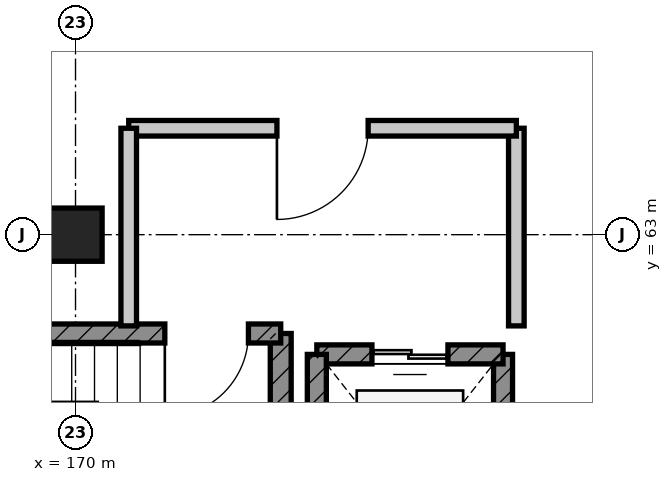
"""IFC4 building model, lengths in metres.
Left out: names, types, materials, properties, quantities, classifications, styles, units other than length and angle.
Written with IfcOpenShell. Run it as: python <this file> out.ifc"""

import sys

from ifc_helpers import new_model, si_unit, direction, frame, frame_2d, origin, origin_2d, place, context, subcontext, project, spatial, rectangle, extrude, element, fill, save


model = new_model("IFC4")
c1 = context("Model", 3, precision=1e-05, world=origin(), true_north=direction((0.0, 1.0)))
c2 = subcontext(c1, "Body", "Model", "MODEL_VIEW")
j1 = project(units=[si_unit("LENGTHUNIT", "METRE"), si_unit("PLANEANGLEUNIT", "RADIAN")], contexts=[c1])
p1 = place(None, origin())
s1 = spatial("IfcSite", under=j1, at=p1, CompositionType="ELEMENT")
p2 = place(p1, origin())
s2 = spatial("IfcBuilding", under=s1, at=p2, CompositionType="ELEMENT")
p3 = place(p2, frame((0.0, 0.0, -4.5)))
s3 = spatial("IfcBuildingStorey", under=s2, at=p3, CompositionType="ELEMENT", Elevation=-4.5)
p4 = place(p3, frame((170.0, 63.0, 0.0), z_axis=(0.0, 0.0, 1.0), x_axis=(1.0, 0.0, 0.0)))
e1 = element("IfcColumn", 1, at=p4, inside=s3, PredefinedType="COLUMN", context=c2, shape_type="SweptSolid", body=[
    extrude(rectangle(XDim=0.7, YDim=0.7, at=origin_2d()), origin(), (0.0, 0.0, 1.0), 4.5),
])
p5 = place(p3, frame((172.7, 58.1, 0.0), z_axis=(0.0, 0.0, 1.0), x_axis=(0.0, 1.0, 0.0)))
e2 = element("IfcWall", 2, at=p5, inside=s3, PredefinedType="SHEAR", context=c2, shape_type="SweptSolid", body=[
    extrude(rectangle(XDim=3.6, YDim=0.275, at=frame_2d((1.8, 0.0))), origin(), (0.0, 0.0, 1.0), 4.2),
])
p6 = place(p3, frame((172.7, 61.7, 0.0), z_axis=(0.0, 0.0, 1.0), x_axis=(-1.0, 0.0, 0.0)))
e3 = element("IfcWall", 3, at=p6, inside=s3, PredefinedType="SHEAR", context=c2, shape_type="SweptSolid", body=[
    extrude(rectangle(XDim=8.6, YDim=0.25, at=frame_2d((4.3, 0.0))), origin(), (0.0, 0.0, 1.0), 4.2),
])
p7 = place(p6, frame((0.425, 0.0, 0.0)))
e4 = element("IfcOpeningElement", 4, at=p7, cuts=e3, PredefinedType="OPENING", context=c2, shape_type="SweptSolid", body=[
    extrude(rectangle(XDim=1.1, YDim=2.1, at=frame_2d((0.55, 1.05))), frame((0.0, 0.135, 0.0), z_axis=(0.0, -1.0, 0.0), x_axis=(1.0, 0.0, 0.0)), (0.0, 0.0, 1.0), 0.27),
])
p8 = place(p3, frame((175.625, 58.375, 0.0), z_axis=(0.0, 0.0, 1.0), x_axis=(0.0, 1.0, 0.0)))
e5 = element("IfcWall", 5, at=p8, inside=s3, PredefinedType="SHEAR", context=c2, shape_type="SweptSolid", body=[
    extrude(rectangle(XDim=3.05, YDim=0.25, at=frame_2d((1.525, 0.0))), origin(), (0.0, 0.0, 1.0), 4.2),
])
p9 = place(p3, frame((175.625, 61.425, 0.0), z_axis=(0.0, 0.0, 1.0), x_axis=(-1.0, 0.0, 0.0)))
e6 = element("IfcWall", 6, at=p9, inside=s3, PredefinedType="SHEAR", context=c2, shape_type="SweptSolid", body=[
    extrude(rectangle(XDim=2.45, YDim=0.25, at=frame_2d((1.225, 0.0))), origin(), (0.0, 0.0, 1.0), 4.2),
])
p10 = place(p9, frame((0.725, 0.0, 0.0)))
e7 = element("IfcOpeningElement", 7, at=p10, cuts=e6, PredefinedType="OPENING", context=c2, shape_type="SweptSolid", body=[
    extrude(rectangle(XDim=1.0, YDim=2.15, at=frame_2d((0.5, 1.075))), frame((0.0, 0.135, 0.0), z_axis=(0.0, -1.0, 0.0), x_axis=(1.0, 0.0, 0.0)), (0.0, 0.0, 1.0), 0.27),
])
p11 = place(p3, frame((173.175, 61.425, 0.0), z_axis=(0.0, 0.0, 1.0), x_axis=(0.0, -1.0, 0.0)))
e8 = element("IfcWall", 8, at=p11, inside=s3, PredefinedType="SHEAR", context=c2, shape_type="SweptSolid", body=[
    extrude(rectangle(XDim=3.05, YDim=0.25, at=frame_2d((1.525, 0.0))), origin(), (0.0, 0.0, 1.0), 4.2),
])
p12 = place(p3, frame((175.8, 61.8, 0.0), z_axis=(0.0, 0.0, 1.0), x_axis=(0.0, 1.0, 0.0)))
e9 = element("IfcWall", 9, at=p12, inside=s3, PredefinedType="PARTITIONING", context=c2, shape_type="SweptSolid", body=[
    extrude(rectangle(XDim=2.6, YDim=0.205, at=frame_2d((1.3, 0.0))), origin(), (0.0, 0.0, 1.0), 3.535),
])
p13 = place(p3, frame((175.8, 64.4, 0.0), z_axis=(0.0, 0.0, 1.0), x_axis=(-1.0, 0.0, 0.0)))
e10 = element("IfcWall", 10, at=p13, inside=s3, PredefinedType="PARTITIONING", context=c2, shape_type="SweptSolid", body=[
    extrude(rectangle(XDim=5.1, YDim=0.205, at=frame_2d((2.55, 0.0))), origin(), (0.0, 0.0, 1.0), 4.2),
])
p14 = place(p13, frame((1.95, 0.0, 0.0)))
e11 = element("IfcOpeningElement", 11, at=p14, cuts=e10, PredefinedType="OPENING", context=c2, shape_type="SweptSolid", body=[
    extrude(rectangle(XDim=1.2, YDim=2.1, at=frame_2d((0.6, 1.05))), frame((0.0, 0.113, 0.0), z_axis=(0.0, -1.0, 0.0), x_axis=(1.0, 0.0, 0.0)), (0.0, 0.0, 1.0), 0.225),
])
p15 = place(p3, frame((170.7, 64.4, 0.0), z_axis=(0.0, 0.0, 1.0), x_axis=(0.0, -1.0, 0.0)))
e12 = element("IfcWall", 12, at=p15, inside=s3, PredefinedType="PARTITIONING", context=c2, shape_type="SweptSolid", body=[
    extrude(rectangle(XDim=2.6, YDim=0.205, at=frame_2d((1.3, 0.0))), origin(), (0.0, 0.0, 1.0), 3.535),
])
p16 = place(p7, origin())
e13 = element("IfcDoor", 13, at=p16, inside=s3, OperationType="SINGLE_SWING_RIGHT", PredefinedType="DOOR", context=c2, shape_type="SweptSolid", body=[
    extrude(rectangle(XDim=1.1, YDim=2.1, at=frame_2d((0.55, 1.05))), frame((0.0, 0.025, 0.0), z_axis=(0.0, -1.0, 0.0), x_axis=(1.0, 0.0, 0.0)), (0.0, 0.0, 1.0), 0.05),
])
fill(e4, e13)
p17 = place(p10, origin())
e14 = element("IfcDoor", 14, at=p17, inside=s3, OperationType="DOUBLE_DOOR_SLIDING", PredefinedType="DOOR", context=c2, shape_type="SweptSolid", body=[
    extrude(rectangle(XDim=1.0, YDim=2.15, at=frame_2d((0.5, 1.075))), frame((0.0, 0.025, 0.0), z_axis=(0.0, -1.0, 0.0), x_axis=(1.0, 0.0, 0.0)), (0.0, 0.0, 1.0), 0.05),
])
fill(e7, e14)
p18 = place(p14, origin())
e15 = element("IfcDoor", 15, at=p18, inside=s3, OperationType="SINGLE_SWING_RIGHT", PredefinedType="DOOR", context=c2, shape_type="SweptSolid", body=[
    extrude(rectangle(XDim=1.2, YDim=2.1, at=frame_2d((0.6, 1.05))), frame((0.0, 0.025, 0.0), z_axis=(0.0, -1.0, 0.0), x_axis=(1.0, 0.0, 0.0)), (0.0, 0.0, 1.0), 0.05),
])
fill(e11, e15)
save(model, sys.argv[1])
